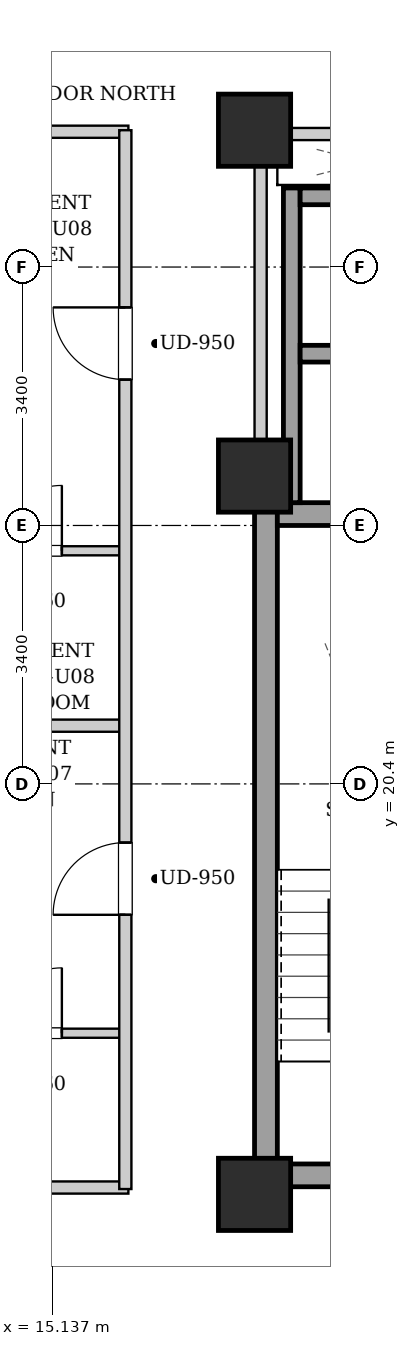
"""IFC4 building model, lengths in metres.
Left out: names, types, materials, properties, quantities, classifications, styles, units other than length and angle.
Written with IfcOpenShell. Run it as: python <this file> out.ifc"""

import sys

from ifc_helpers import new_model, si_unit, direction, frame, frame_2d, origin, origin_2d, place, context, subcontext, project, spatial, rectangle, extrude, element, fill, save


model = new_model("IFC4")
c1 = context("Model", 3, precision=1e-05, world=origin(), true_north=direction((0.0, 1.0)))
c2 = subcontext(c1, "Body", "Model", "MODEL_VIEW")
j1 = project(units=[si_unit("LENGTHUNIT", "METRE"), si_unit("PLANEANGLEUNIT", "RADIAN")], contexts=[c1])
p1 = place(None, origin())
s1 = spatial("IfcSite", under=j1, at=p1, CompositionType="ELEMENT")
p2 = place(p1, origin())
s2 = spatial("IfcBuilding", under=s1, at=p2, CompositionType="ELEMENT")
p3 = place(p2, frame((0.0, 0.0, 147.15)))
s3 = spatial("IfcBuildingStorey", under=s2, at=p3, CompositionType="ELEMENT", Elevation=147.15)
for number, where, z_axis, x_axis in (
    (1, (17.8, 15.0, 0.0), (0.0, 0.0, 1.0), (1.0, 0.0, 0.0)),
    (2, (17.8, 29.0, 0.0), (0.0, 0.0, 1.0), (1.0, 0.0, 0.0)),
    (3, (17.8, 24.45, 0.0), (0.0, 0.0, 1.0), (1.0, 0.0, 0.0)),
):
    element("IfcColumn", number, at=place(p3, frame(where, z_axis=z_axis, x_axis=x_axis)), inside=s3, PredefinedType="COLUMN", context=c2, shape_type="SweptSolid", body=[
        extrude(rectangle(XDim=0.95, YDim=0.95, at=origin_2d()), origin(), (0.0, 0.0, 1.0), 3.25),
    ])
p4 = place(p3, frame((17.95, 15.1, 0.0), z_axis=(0.0, 0.0, 1.0), x_axis=(0.0, 1.0, 0.0)))
e4 = element("IfcWall", 4, at=p4, inside=s3, PredefinedType="SHEAR", context=c2, shape_type="SweptSolid", body=[
    extrude(rectangle(XDim=9.0, YDim=0.3, at=frame_2d((4.5, 0.0))), origin(), (0.0, 0.0, 1.0), 2.99),
])
p5 = place(p3, frame((18.1, 23.95, 0.0), z_axis=(0.0, 0.0, 1.0), x_axis=(1.0, 0.0, 0.0)))
e5 = element("IfcWall", 5, at=p5, inside=s3, PredefinedType="SHEAR", context=c2, shape_type="SweptSolid", body=[
    extrude(rectangle(XDim=2.85, YDim=0.3, at=frame_2d((1.425, 0.0))), origin(), (0.0, 0.0, 1.0), 2.99),
])
p6 = place(p3, frame((18.1, 15.25, 0.0), z_axis=(0.0, 0.0, 1.0), x_axis=(1.0, 0.0, 0.0)))
e6 = element("IfcWall", 6, at=p6, inside=s3, PredefinedType="SHEAR", context=c2, shape_type="SweptSolid", body=[
    extrude(rectangle(XDim=2.85, YDim=0.3, at=frame_2d((1.425, 0.0))), origin(), (0.0, 0.0, 1.0), 2.99),
])
p7 = place(p6, frame((0.86, 0.0, 0.0)))
e7 = element("IfcOpeningElement", 7, at=p7, cuts=e6, PredefinedType="OPENING", context=c2, shape_type="SweptSolid", body=[
    extrude(rectangle(XDim=1.1, YDim=2.05, at=frame_2d((0.55, 1.025))), frame((0.0, 0.16, 0.0), z_axis=(0.0, -1.0, 0.0), x_axis=(1.0, 0.0, 0.0)), (0.0, 0.0, 1.0), 0.32),
])
p8 = place(p3, frame((18.29, 24.1, 0.0), z_axis=(0.0, 0.0, 1.0), x_axis=(0.0, 1.0, 0.0)))
e8 = element("IfcWall", 8, at=p8, inside=s3, PredefinedType="SHEAR", context=c2, shape_type="SweptSolid", body=[
    extrude(rectangle(XDim=4.14, YDim=0.22, at=frame_2d((2.07, 0.0))), origin(), (0.0, 0.0, 1.0), 2.99),
])
for number, where, z_axis, x_axis in (
    (9, (18.4, 26.06, 0.0), (0.0, 0.0, 1.0), (1.0, 0.0, 0.0)),
    (10, (18.4, 28.13, 0.0), (0.0, 0.0, 1.0), (1.0, 0.0, 0.0)),
):
    element("IfcWall", number, at=place(p3, frame(where, z_axis=z_axis, x_axis=x_axis)), inside=s3, PredefinedType="SHEAR", context=c2, shape_type="SweptSolid", body=[
        extrude(rectangle(XDim=1.9, YDim=0.22, at=frame_2d((0.95, 0.0))), origin(), (0.0, 0.0, 1.0), 2.99),
    ])
p9 = place(p3, frame((17.88, 24.12, 0.0), z_axis=(0.0, 0.0, 1.0), x_axis=(0.0, 1.0, 0.0)))
e11 = element("IfcWall", 11, at=p9, inside=s3, PredefinedType="PARTITIONING", context=c2, shape_type="SweptSolid", body=[
    extrude(rectangle(XDim=4.76, YDim=0.16, at=frame_2d((2.38, 0.0))), origin(), (0.0, 0.0, 1.0), 2.325),
])
p10 = place(p3, frame((17.96, 28.95, 0.0), z_axis=(0.0, 0.0, 1.0), x_axis=(1.0, 0.0, 0.0)))
e12 = element("IfcWall", 12, at=p10, inside=s3, PredefinedType="PARTITIONING", context=c2, shape_type="SweptSolid", body=[
    extrude(rectangle(XDim=4.29, YDim=0.16, at=frame_2d((2.145, 0.0))), origin(), (0.0, 0.0, 1.0), 2.442),
])
p11 = place(p10, frame((1.695, 0.0, 0.0)))
e13 = element("IfcOpeningElement", 13, at=p11, cuts=e12, PredefinedType="OPENING", context=c2, shape_type="SweptSolid", body=[
    extrude(rectangle(XDim=0.86, YDim=2.05, at=frame_2d((0.43, 1.025))), frame((0.0, 0.09, 0.0), z_axis=(0.0, -1.0, 0.0), x_axis=(1.0, 0.0, 0.0)), (0.0, 0.0, 1.0), 0.18),
])
for number, where, z_axis, x_axis in (
    (14, (7.78, 15.09, 0.0), (0.0, 0.0, 1.0), (1.0, 0.0, 0.0)),
    (15, (7.78, 28.98, 0.0), (0.0, 0.0, 1.0), (1.0, 0.0, 0.0)),
):
    element("IfcWall", number, at=place(p3, frame(where, z_axis=z_axis, x_axis=x_axis)), inside=s3, PredefinedType="PARTITIONING", context=c2, shape_type="SweptSolid", body=[
        extrude(rectangle(XDim=8.36, YDim=0.16, at=frame_2d((4.18, 0.0))), origin(), (0.0, 0.0, 1.0), 2.442),
    ])
p12 = place(p3, frame((7.78, 21.166, 0.0), z_axis=(0.0, 0.0, 1.0), x_axis=(1.0, 0.0, 0.0)))
e16 = element("IfcWall", 16, at=p12, inside=s3, PredefinedType="PARTITIONING", context=c2, shape_type="SweptSolid", body=[
    extrude(rectangle(XDim=8.28, YDim=0.16, at=frame_2d((4.14, 0.0))), origin(), (0.0, 0.0, 1.0), 2.99),
])
p13 = place(p3, frame((13.61, 17.12, 0.0), z_axis=(0.0, 0.0, 1.0), x_axis=(1.0, 0.0, 0.0)))
e17 = element("IfcWall", 17, at=p13, inside=s3, PredefinedType="PARTITIONING", context=c2, shape_type="SweptSolid", body=[
    extrude(rectangle(XDim=2.45, YDim=0.12, at=frame_2d((1.225, 0.0))), origin(), (0.0, 0.0, 1.0), 2.99),
])
p14 = place(p13, frame((0.795, 0.0, 0.0)))
e18 = element("IfcOpeningElement", 18, at=p14, cuts=e17, PredefinedType="OPENING", context=c2, shape_type="SweptSolid", body=[
    extrude(rectangle(XDim=0.86, YDim=2.05, at=frame_2d((0.43, 1.025))), frame((0.0, 0.07, 0.0), z_axis=(0.0, -1.0, 0.0), x_axis=(1.0, 0.0, 0.0)), (0.0, 0.0, 1.0), 0.14),
])
p15 = place(p3, frame((13.61, 23.467, 0.0), z_axis=(0.0, 0.0, 1.0), x_axis=(1.0, 0.0, 0.0)))
e19 = element("IfcWall", 19, at=p15, inside=s3, PredefinedType="PARTITIONING", context=c2, shape_type="SweptSolid", body=[
    extrude(rectangle(XDim=2.45, YDim=0.12, at=frame_2d((1.225, 0.0))), origin(), (0.0, 0.0, 1.0), 2.99),
])
p16 = place(p15, frame((0.795, 0.0, 0.0)))
e20 = element("IfcOpeningElement", 20, at=p16, cuts=e19, PredefinedType="OPENING", context=c2, shape_type="SweptSolid", body=[
    extrude(rectangle(XDim=0.86, YDim=2.05, at=frame_2d((0.43, 1.025))), frame((0.0, 0.07, 0.0), z_axis=(0.0, -1.0, 0.0), x_axis=(1.0, 0.0, 0.0)), (0.0, 0.0, 1.0), 0.14),
])
p17 = place(p3, frame((16.1, 15.07, 0.0), z_axis=(0.0, 0.0, 1.0), x_axis=(0.0, 1.0, 0.0)))
e21 = element("IfcWall", 21, at=p17, inside=s3, PredefinedType="PARTITIONING", context=c2, shape_type="SweptSolid", body=[
    extrude(rectangle(XDim=13.93, YDim=0.16, at=frame_2d((6.965, 0.0))), origin(), (0.0, 0.0, 1.0), 2.99),
])
p18 = place(p17, frame((3.608, 0.0, 0.0)))
e22 = element("IfcOpeningElement", 22, at=p18, cuts=e21, PredefinedType="OPENING", context=c2, shape_type="SweptSolid", body=[
    extrude(rectangle(XDim=0.95, YDim=2.1, at=frame_2d((0.475, 1.05))), frame((0.0, 0.09, 0.0), z_axis=(0.0, -1.0, 0.0), x_axis=(1.0, 0.0, 0.0)), (0.0, 0.0, 1.0), 0.18),
])
p19 = place(p17, frame((10.649, 0.0, 0.0)))
e23 = element("IfcOpeningElement", 23, at=p19, cuts=e21, PredefinedType="OPENING", context=c2, shape_type="SweptSolid", body=[
    extrude(rectangle(XDim=0.95, YDim=2.1, at=frame_2d((0.475, 1.05))), frame((0.0, 0.09, 0.0), z_axis=(0.0, -1.0, 0.0), x_axis=(1.0, 0.0, 0.0)), (0.0, 0.0, 1.0), 0.18),
])
p20 = place(p14, origin())
e24 = element("IfcDoor", 24, at=p20, inside=s3, OperationType="SINGLE_SWING_RIGHT", PredefinedType="DOOR", context=c2, shape_type="SweptSolid", body=[
    extrude(rectangle(XDim=0.86, YDim=2.05, at=frame_2d((0.43, 1.025))), frame((0.0, 0.025, 0.0), z_axis=(0.0, -1.0, 0.0), x_axis=(1.0, 0.0, 0.0)), (0.0, 0.0, 1.0), 0.05),
])
fill(e18, e24)
p21 = place(p16, origin())
e25 = element("IfcDoor", 25, at=p21, inside=s3, OperationType="SINGLE_SWING_RIGHT", PredefinedType="DOOR", context=c2, shape_type="SweptSolid", body=[
    extrude(rectangle(XDim=0.86, YDim=2.05, at=frame_2d((0.43, 1.025))), frame((0.0, 0.025, 0.0), z_axis=(0.0, -1.0, 0.0), x_axis=(1.0, 0.0, 0.0)), (0.0, 0.0, 1.0), 0.05),
])
fill(e20, e25)
p22 = place(p18, origin())
e26 = element("IfcDoor", 26, at=p22, inside=s3, OperationType="SINGLE_SWING_LEFT", PredefinedType="DOOR", context=c2, shape_type="SweptSolid", body=[
    extrude(rectangle(XDim=0.95, YDim=2.1, at=frame_2d((0.475, 1.05))), frame((0.0, 0.025, 0.0), z_axis=(0.0, -1.0, 0.0), x_axis=(1.0, 0.0, 0.0)), (0.0, 0.0, 1.0), 0.05),
])
fill(e22, e26)
p23 = place(p19, origin())
e27 = element("IfcDoor", 27, at=p23, inside=s3, OperationType="SINGLE_SWING_RIGHT", PredefinedType="DOOR", context=c2, shape_type="SweptSolid", body=[
    extrude(rectangle(XDim=0.95, YDim=2.1, at=frame_2d((0.475, 1.05))), frame((0.0, 0.025, 0.0), z_axis=(0.0, -1.0, 0.0), x_axis=(1.0, 0.0, 0.0)), (0.0, 0.0, 1.0), 0.05),
])
fill(e23, e27)
save(model, sys.argv[1])
